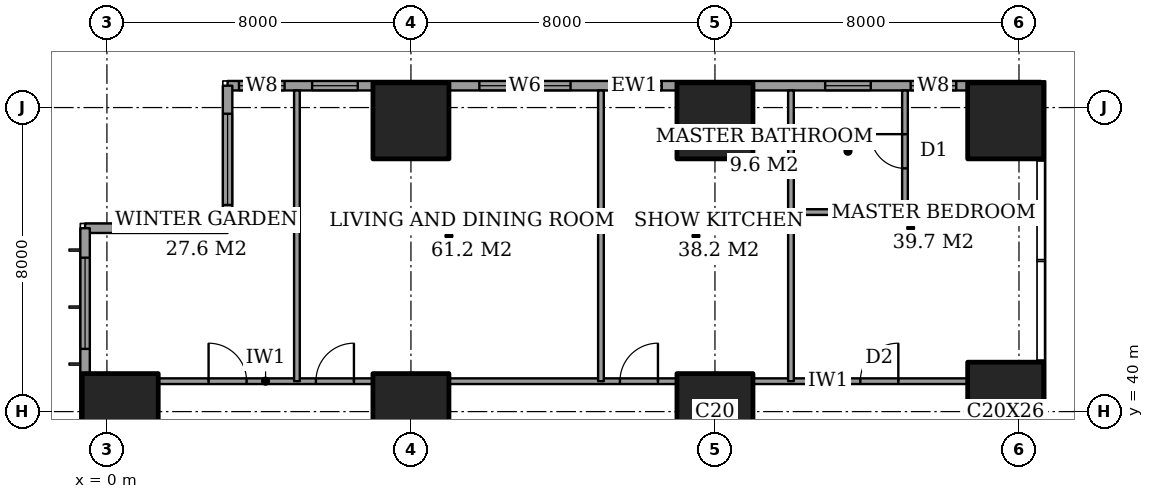
"""IFC4 building model, lengths in metres.
Left out: names, types, materials, properties, quantities, classifications, styles, units other than length and angle.
Written with IfcOpenShell. Run it as: python <this file> out.ifc"""

import sys

from ifc_helpers import new_model, si_unit, direction, frame, frame_2d, origin, origin_2d, place, context, subcontext, project, spatial, rectangle, extrude, element, fill, save


model = new_model("IFC4")
c1 = context("Model", 3, precision=1e-05, world=origin(), true_north=direction((0.0, 1.0)))
c2 = subcontext(c1, "Body", "Model", "MODEL_VIEW")
j1 = project(units=[si_unit("LENGTHUNIT", "METRE"), si_unit("PLANEANGLEUNIT", "RADIAN")], contexts=[c1])
p1 = place(None, origin())
s1 = spatial("IfcSite", under=j1, at=p1, CompositionType="ELEMENT")
p2 = place(p1, origin())
s2 = spatial("IfcBuilding", under=s1, at=p2, CompositionType="ELEMENT")
p3 = place(p2, frame((0.0, 0.0, 36.8)))
s3 = spatial("IfcBuildingStorey", under=s2, at=p3, CompositionType="ELEMENT", Elevation=36.8)
for number, where, z_axis, x_axis in (
    (1, (0.35, 40.0, 0.0), (0.0, 0.0, 1.0), (1.0, 0.0, 0.0)),
    (2, (8.0, 40.0, 0.0), (0.0, 0.0, 1.0), (1.0, 0.0, 0.0)),
    (3, (8.0, 47.65, 0.0), (0.0, 0.0, 1.0), (1.0, 0.0, 0.0)),
    (4, (16.0, 40.0, 0.0), (0.0, 0.0, 1.0), (1.0, 0.0, 0.0)),
    (5, (16.0, 47.65, 0.0), (0.0, 0.0, 1.0), (1.0, 0.0, 0.0)),
):
    element("IfcColumn", number, at=place(p3, frame(where, z_axis=z_axis, x_axis=x_axis)), inside=s3, PredefinedType="COLUMN", context=c2, shape_type="SweptSolid", body=[
        extrude(rectangle(XDim=2.0, YDim=2.0, at=origin_2d()), origin(), (0.0, 0.0, 1.0), 3.6),
    ])
p4 = place(p3, frame((23.65, 40.0, 0.0), z_axis=(0.0, 0.0, 1.0), x_axis=(1.0, 0.0, 0.0)))
e6 = element("IfcColumn", 6, at=p4, inside=s3, PredefinedType="COLUMN", context=c2, shape_type="SweptSolid", body=[
    extrude(rectangle(XDim=2.0, YDim=2.6, at=origin_2d()), origin(), (0.0, 0.0, 1.0), 3.6),
])
p5 = place(p3, frame((23.65, 47.65, 0.0), z_axis=(0.0, 0.0, 1.0), x_axis=(1.0, 0.0, 0.0)))
e7 = element("IfcColumn", 7, at=p5, inside=s3, PredefinedType="COLUMN", context=c2, shape_type="SweptSolid", body=[
    extrude(rectangle(XDim=2.0, YDim=2.0, at=origin_2d()), origin(), (0.0, 0.0, 1.0), 3.6),
])
p6 = place(p3, frame((24.575, 48.575, 0.0), z_axis=(0.0, 0.0, 1.0), x_axis=(-1.0, 0.0, 0.0)))
e8 = element("IfcWall", 8, at=p6, inside=s3, PredefinedType="SOLIDWALL", context=c2, shape_type="SweptSolid", body=[
    extrude(rectangle(XDim=21.4, YDim=0.25, at=frame_2d((10.7, 0.0))), origin(), (0.0, 0.0, 1.0), 3.6),
])
p7 = place(p6, frame((2.225, 0.0, 0.6)))
e9 = element("IfcOpeningElement", 9, at=p7, cuts=e8, PredefinedType="OPENING", context=c2, shape_type="SweptSolid", body=[
    extrude(rectangle(XDim=1.2, YDim=2.0, at=frame_2d((0.6, 1.0))), frame((0.0, 0.135, 0.0), z_axis=(0.0, -1.0, 0.0), x_axis=(1.0, 0.0, 0.0)), (0.0, 0.0, 1.0), 0.27),
])
p8 = place(p6, frame((4.475, 0.0, 0.6)))
e10 = element("IfcOpeningElement", 10, at=p8, cuts=e8, PredefinedType="OPENING", context=c2, shape_type="SweptSolid", body=[
    extrude(rectangle(XDim=1.2, YDim=2.0, at=frame_2d((0.6, 1.0))), frame((0.0, 0.135, 0.0), z_axis=(0.0, -1.0, 0.0), x_axis=(1.0, 0.0, 0.0)), (0.0, 0.0, 1.0), 0.27),
])
p9 = place(p6, frame((9.975, 0.0, 0.6)))
e11 = element("IfcOpeningElement", 11, at=p9, cuts=e8, PredefinedType="OPENING", context=c2, shape_type="SweptSolid", body=[
    extrude(rectangle(XDim=1.2, YDim=2.0, at=frame_2d((0.6, 1.0))), frame((0.0, 0.135, 0.0), z_axis=(0.0, -1.0, 0.0), x_axis=(1.0, 0.0, 0.0)), (0.0, 0.0, 1.0), 0.27),
])
p10 = place(p6, frame((12.375, 0.0, 0.6)))
e12 = element("IfcOpeningElement", 12, at=p10, cuts=e8, PredefinedType="OPENING", context=c2, shape_type="SweptSolid", body=[
    extrude(rectangle(XDim=2.4, YDim=2.0, at=frame_2d((1.2, 1.0))), frame((0.0, 0.135, 0.0), z_axis=(0.0, -1.0, 0.0), x_axis=(1.0, 0.0, 0.0)), (0.0, 0.0, 1.0), 0.27),
])
p11 = place(p6, frame((17.975, 0.0, 0.6)))
e13 = element("IfcOpeningElement", 13, at=p11, cuts=e8, PredefinedType="OPENING", context=c2, shape_type="SweptSolid", body=[
    extrude(rectangle(XDim=1.2, YDim=2.0, at=frame_2d((0.6, 1.0))), frame((0.0, 0.135, 0.0), z_axis=(0.0, -1.0, 0.0), x_axis=(1.0, 0.0, 0.0)), (0.0, 0.0, 1.0), 0.27),
])
p12 = place(p6, frame((19.9, 0.0, 0.6)))
e14 = element("IfcOpeningElement", 14, at=p12, cuts=e8, PredefinedType="OPENING", context=c2, shape_type="SweptSolid", body=[
    extrude(rectangle(XDim=1.2, YDim=2.0, at=frame_2d((0.6, 1.0))), frame((0.0, 0.135, 0.0), z_axis=(0.0, -1.0, 0.0), x_axis=(1.0, 0.0, 0.0)), (0.0, 0.0, 1.0), 0.27),
])
p13 = place(p3, frame((3.175, 48.575, 0.0), z_axis=(0.0, 0.0, 1.0), x_axis=(0.0, -1.0, 0.0)))
e15 = element("IfcWall", 15, at=p13, inside=s3, PredefinedType="SOLIDWALL", context=c2, shape_type="SweptSolid", body=[
    extrude(rectangle(XDim=3.75, YDim=0.25, at=frame_2d((1.875, 0.0))), origin(), (0.0, 0.0, 1.0), 3.6),
])
p14 = place(p13, frame((0.738, 0.0, 0.6)))
e16 = element("IfcOpeningElement", 16, at=p14, cuts=e15, PredefinedType="OPENING", context=c2, shape_type="SweptSolid", body=[
    extrude(rectangle(XDim=2.4, YDim=2.0, at=frame_2d((1.2, 1.0))), frame((0.0, 0.135, 0.0), z_axis=(0.0, -1.0, 0.0), x_axis=(1.0, 0.0, 0.0)), (0.0, 0.0, 1.0), 0.27),
])
p15 = place(p3, frame((3.175, 44.825, 0.0), z_axis=(0.0, 0.0, 1.0), x_axis=(-1.0, 0.0, 0.0)))
e17 = element("IfcWall", 17, at=p15, inside=s3, PredefinedType="SOLIDWALL", context=c2, shape_type="SweptSolid", body=[
    extrude(rectangle(XDim=3.75, YDim=0.25, at=frame_2d((1.875, 0.0))), origin(), (0.0, 0.0, 1.0), 3.6),
])
p16 = place(p15, frame((0.613, 0.0, 0.6)))
e18 = element("IfcOpeningElement", 18, at=p16, cuts=e17, PredefinedType="OPENING", context=c2, shape_type="SweptSolid", body=[
    extrude(rectangle(XDim=2.4, YDim=2.0, at=frame_2d((1.2, 1.0))), frame((0.0, 0.135, 0.0), z_axis=(0.0, -1.0, 0.0), x_axis=(1.0, 0.0, 0.0)), (0.0, 0.0, 1.0), 0.27),
])
p17 = place(p3, frame((-0.575, 44.825, 0.0), z_axis=(0.0, 0.0, 1.0), x_axis=(0.0, -1.0, 0.0)))
e19 = element("IfcWall", 19, at=p17, inside=s3, PredefinedType="SOLIDWALL", context=c2, shape_type="SweptSolid", body=[
    extrude(rectangle(XDim=41.65, YDim=0.25, at=frame_2d((20.825, 0.0))), origin(), (0.0, 0.0, 1.0), 3.6),
])
p18 = place(p17, frame((0.775, 0.0, 0.6)))
e20 = element("IfcOpeningElement", 20, at=p18, cuts=e19, PredefinedType="OPENING", context=c2, shape_type="SweptSolid", body=[
    extrude(rectangle(XDim=2.4, YDim=2.0, at=frame_2d((1.2, 1.0))), frame((0.0, 0.135, 0.0), z_axis=(0.0, -1.0, 0.0), x_axis=(1.0, 0.0, 0.0)), (0.0, 0.0, 1.0), 0.27),
])
p19 = place(p17, frame((6.1, 0.0, 0.6)))
e21 = element("IfcOpeningElement", 21, at=p19, cuts=e19, PredefinedType="OPENING", context=c2, shape_type="SweptSolid", body=[
    extrude(rectangle(XDim=1.2, YDim=2.0, at=frame_2d((0.6, 1.0))), frame((0.0, 0.135, 0.0), z_axis=(0.0, -1.0, 0.0), x_axis=(1.0, 0.0, 0.0)), (0.0, 0.0, 1.0), 0.27),
])
p20 = place(p17, frame((8.425, 0.0, 0.6)))
e22 = element("IfcOpeningElement", 22, at=p20, cuts=e19, PredefinedType="OPENING", context=c2, shape_type="SweptSolid", body=[
    extrude(rectangle(XDim=2.4, YDim=2.0, at=frame_2d((1.2, 1.0))), frame((0.0, 0.135, 0.0), z_axis=(0.0, -1.0, 0.0), x_axis=(1.0, 0.0, 0.0)), (0.0, 0.0, 1.0), 0.27),
])
p21 = place(p17, frame((15.625, 0.0, 0.6)))
e23 = element("IfcOpeningElement", 23, at=p21, cuts=e19, PredefinedType="OPENING", context=c2, shape_type="SweptSolid", body=[
    extrude(rectangle(XDim=2.4, YDim=2.0, at=frame_2d((1.2, 1.0))), frame((0.0, 0.135, 0.0), z_axis=(0.0, -1.0, 0.0), x_axis=(1.0, 0.0, 0.0)), (0.0, 0.0, 1.0), 0.27),
])
p22 = place(p17, frame((23.625, 0.0, 0.6)))
e24 = element("IfcOpeningElement", 24, at=p22, cuts=e19, PredefinedType="OPENING", context=c2, shape_type="SweptSolid", body=[
    extrude(rectangle(XDim=2.4, YDim=2.0, at=frame_2d((1.2, 1.0))), frame((0.0, 0.135, 0.0), z_axis=(0.0, -1.0, 0.0), x_axis=(1.0, 0.0, 0.0)), (0.0, 0.0, 1.0), 0.27),
])
p23 = place(p17, frame((30.825, 0.0, 0.6)))
e25 = element("IfcOpeningElement", 25, at=p23, cuts=e19, PredefinedType="OPENING", context=c2, shape_type="SweptSolid", body=[
    extrude(rectangle(XDim=2.4, YDim=2.0, at=frame_2d((1.2, 1.0))), frame((0.0, 0.135, 0.0), z_axis=(0.0, -1.0, 0.0), x_axis=(1.0, 0.0, 0.0)), (0.0, 0.0, 1.0), 0.27),
])
p24 = place(p17, frame((34.5, 0.0, 0.6)))
e26 = element("IfcOpeningElement", 26, at=p24, cuts=e19, PredefinedType="OPENING", context=c2, shape_type="SweptSolid", body=[
    extrude(rectangle(XDim=1.2, YDim=2.0, at=frame_2d((0.6, 1.0))), frame((0.0, 0.135, 0.0), z_axis=(0.0, -1.0, 0.0), x_axis=(1.0, 0.0, 0.0)), (0.0, 0.0, 1.0), 0.27),
])
p25 = place(p17, frame((38.475, 0.0, 0.6)))
e27 = element("IfcOpeningElement", 27, at=p25, cuts=e19, PredefinedType="OPENING", context=c2, shape_type="SweptSolid", body=[
    extrude(rectangle(XDim=2.4, YDim=2.0, at=frame_2d((1.2, 1.0))), frame((0.0, 0.135, 0.0), z_axis=(0.0, -1.0, 0.0), x_axis=(1.0, 0.0, 0.0)), (0.0, 0.0, 1.0), 0.27),
])
p26 = place(p3, frame((1.35, 40.8, 0.0), z_axis=(0.0, 0.0, 1.0), x_axis=(1.0, 0.0, 0.0)))
e28 = element("IfcWall", 28, at=p26, inside=s3, PredefinedType="PARTITIONING", context=c2, shape_type="SweptSolid", body=[
    extrude(rectangle(XDim=5.65, YDim=0.15, at=frame_2d((2.825, 0.0))), origin(), (0.0, 0.0, 1.0), 3.35),
])
p27 = place(p26, frame((1.325, 0.0, 0.0)))
e29 = element("IfcOpeningElement", 29, at=p27, cuts=e28, PredefinedType="OPENING", context=c2, shape_type="SweptSolid", body=[
    extrude(rectangle(XDim=1.0, YDim=2.1, at=frame_2d((0.5, 1.05))), frame((0.0, 0.085, 0.0), z_axis=(0.0, -1.0, 0.0), x_axis=(1.0, 0.0, 0.0)), (0.0, 0.0, 1.0), 0.17),
])
p28 = place(p26, frame((4.15, 0.0, 0.0)))
e30 = element("IfcOpeningElement", 30, at=p28, cuts=e28, PredefinedType="OPENING", context=c2, shape_type="SweptSolid", body=[
    extrude(rectangle(XDim=1.0, YDim=2.1, at=frame_2d((0.5, 1.05))), frame((0.0, 0.085, 0.0), z_axis=(0.0, -1.0, 0.0), x_axis=(1.0, 0.0, 0.0)), (0.0, 0.0, 1.0), 0.17),
])
p29 = place(p3, frame((9.0, 40.8, 0.0), z_axis=(0.0, 0.0, 1.0), x_axis=(1.0, 0.0, 0.0)))
e31 = element("IfcWall", 31, at=p29, inside=s3, PredefinedType="PARTITIONING", context=c2, shape_type="SweptSolid", body=[
    extrude(rectangle(XDim=6.0, YDim=0.15, at=frame_2d((3.0, 0.0))), origin(), (0.0, 0.0, 1.0), 3.35),
])
p30 = place(p29, frame((4.5, 0.0, 0.0)))
e32 = element("IfcOpeningElement", 32, at=p30, cuts=e31, PredefinedType="OPENING", context=c2, shape_type="SweptSolid", body=[
    extrude(rectangle(XDim=1.0, YDim=2.1, at=frame_2d((0.5, 1.05))), frame((0.0, 0.085, 0.0), z_axis=(0.0, -1.0, 0.0), x_axis=(1.0, 0.0, 0.0)), (0.0, 0.0, 1.0), 0.17),
])
p31 = place(p3, frame((17.0, 40.8, 0.0), z_axis=(0.0, 0.0, 1.0), x_axis=(1.0, 0.0, 0.0)))
e33 = element("IfcWall", 33, at=p31, inside=s3, PredefinedType="PARTITIONING", context=c2, shape_type="SweptSolid", body=[
    extrude(rectangle(XDim=5.65, YDim=0.15, at=frame_2d((2.825, 0.0))), origin(), (0.0, 0.0, 1.0), 3.35),
])
p32 = place(p31, frame((2.825, 0.0, 0.0)))
e34 = element("IfcOpeningElement", 34, at=p32, cuts=e33, PredefinedType="OPENING", context=c2, shape_type="SweptSolid", body=[
    extrude(rectangle(XDim=1.0, YDim=2.1, at=frame_2d((0.5, 1.05))), frame((0.0, 0.085, 0.0), z_axis=(0.0, -1.0, 0.0), x_axis=(1.0, 0.0, 0.0)), (0.0, 0.0, 1.0), 0.17),
])
p33 = place(p3, frame((18.0, 45.25, 0.0), z_axis=(0.0, 0.0, 1.0), x_axis=(1.0, 0.0, 0.0)))
e35 = element("IfcWall", 35, at=p33, inside=s3, PredefinedType="PARTITIONING", context=c2, shape_type="SweptSolid", body=[
    extrude(rectangle(XDim=3.0, YDim=0.15, at=frame_2d((1.5, 0.0))), origin(), (0.0, 0.0, 1.0), 3.35),
])
for number, where, z_axis, x_axis in (
    (36, (5.0, 40.8, 0.0), (0.0, 0.0, 1.0), (0.0, 1.0, 0.0)),
    (37, (13.0, 40.8, 0.0), (0.0, 0.0, 1.0), (0.0, 1.0, 0.0)),
    (38, (18.0, 40.8, 0.0), (0.0, 0.0, 1.0), (0.0, 1.0, 0.0)),
):
    element("IfcWall", number, at=place(p3, frame(where, z_axis=z_axis, x_axis=x_axis)), inside=s3, PredefinedType="PARTITIONING", context=c2, shape_type="SweptSolid", body=[
        extrude(rectangle(XDim=7.65, YDim=0.15, at=frame_2d((3.825, 0.0))), origin(), (0.0, 0.0, 1.0), 3.35),
    ])
p34 = place(p3, frame((21.0, 45.25, 0.0), z_axis=(0.0, 0.0, 1.0), x_axis=(0.0, 1.0, 0.0)))
e39 = element("IfcWall", 39, at=p34, inside=s3, PredefinedType="PARTITIONING", context=c2, shape_type="SweptSolid", body=[
    extrude(rectangle(XDim=3.2, YDim=0.15, at=frame_2d((1.6, 0.0))), origin(), (0.0, 0.0, 1.0), 3.35),
])
p35 = place(p34, frame((1.15, 0.0, 0.0)))
e40 = element("IfcOpeningElement", 40, at=p35, cuts=e39, PredefinedType="OPENING", context=c2, shape_type="SweptSolid", body=[
    extrude(rectangle(XDim=0.9, YDim=2.1, at=frame_2d((0.45, 1.05))), frame((0.0, 0.085, 0.0), z_axis=(0.0, -1.0, 0.0), x_axis=(1.0, 0.0, 0.0)), (0.0, 0.0, 1.0), 0.17),
])
p36 = place(p7, origin())
e41 = element("IfcWindow", 41, at=p36, inside=s3, PartitioningType="SINGLE_PANEL", PredefinedType="WINDOW", context=c2, shape_type="SweptSolid", body=[
    extrude(rectangle(XDim=1.2, YDim=2.0, at=frame_2d((0.6, 1.0))), frame((0.0, 0.03, 0.0), z_axis=(0.0, -1.0, 0.0), x_axis=(1.0, 0.0, 0.0)), (0.0, 0.0, 1.0), 0.06),
])
fill(e9, e41)
p37 = place(p8, origin())
e42 = element("IfcWindow", 42, at=p37, inside=s3, PartitioningType="SINGLE_PANEL", PredefinedType="WINDOW", context=c2, shape_type="SweptSolid", body=[
    extrude(rectangle(XDim=1.2, YDim=2.0, at=frame_2d((0.6, 1.0))), frame((0.0, 0.03, 0.0), z_axis=(0.0, -1.0, 0.0), x_axis=(1.0, 0.0, 0.0)), (0.0, 0.0, 1.0), 0.06),
])
fill(e10, e42)
p38 = place(p9, origin())
e43 = element("IfcWindow", 43, at=p38, inside=s3, PartitioningType="SINGLE_PANEL", PredefinedType="WINDOW", context=c2, shape_type="SweptSolid", body=[
    extrude(rectangle(XDim=1.2, YDim=2.0, at=frame_2d((0.6, 1.0))), frame((0.0, 0.03, 0.0), z_axis=(0.0, -1.0, 0.0), x_axis=(1.0, 0.0, 0.0)), (0.0, 0.0, 1.0), 0.06),
])
fill(e11, e43)
p39 = place(p10, origin())
e44 = element("IfcWindow", 44, at=p39, inside=s3, PartitioningType="SINGLE_PANEL", PredefinedType="WINDOW", context=c2, shape_type="SweptSolid", body=[
    extrude(rectangle(XDim=2.4, YDim=2.0, at=frame_2d((1.2, 1.0))), frame((0.0, 0.03, 0.0), z_axis=(0.0, -1.0, 0.0), x_axis=(1.0, 0.0, 0.0)), (0.0, 0.0, 1.0), 0.06),
])
fill(e12, e44)
p40 = place(p11, origin())
e45 = element("IfcWindow", 45, at=p40, inside=s3, PartitioningType="SINGLE_PANEL", PredefinedType="WINDOW", context=c2, shape_type="SweptSolid", body=[
    extrude(rectangle(XDim=1.2, YDim=2.0, at=frame_2d((0.6, 1.0))), frame((0.0, 0.03, 0.0), z_axis=(0.0, -1.0, 0.0), x_axis=(1.0, 0.0, 0.0)), (0.0, 0.0, 1.0), 0.06),
])
fill(e13, e45)
p41 = place(p12, origin())
e46 = element("IfcWindow", 46, at=p41, inside=s3, PartitioningType="SINGLE_PANEL", PredefinedType="WINDOW", context=c2, shape_type="SweptSolid", body=[
    extrude(rectangle(XDim=1.2, YDim=2.0, at=frame_2d((0.6, 1.0))), frame((0.0, 0.03, 0.0), z_axis=(0.0, -1.0, 0.0), x_axis=(1.0, 0.0, 0.0)), (0.0, 0.0, 1.0), 0.06),
])
fill(e14, e46)
p42 = place(p14, origin())
e47 = element("IfcWindow", 47, at=p42, inside=s3, PartitioningType="SINGLE_PANEL", PredefinedType="WINDOW", context=c2, shape_type="SweptSolid", body=[
    extrude(rectangle(XDim=2.4, YDim=2.0, at=frame_2d((1.2, 1.0))), frame((0.0, 0.03, 0.0), z_axis=(0.0, -1.0, 0.0), x_axis=(1.0, 0.0, 0.0)), (0.0, 0.0, 1.0), 0.06),
])
fill(e16, e47)
p43 = place(p16, origin())
e48 = element("IfcWindow", 48, at=p43, inside=s3, PartitioningType="SINGLE_PANEL", PredefinedType="WINDOW", context=c2, shape_type="SweptSolid", body=[
    extrude(rectangle(XDim=2.4, YDim=2.0, at=frame_2d((1.2, 1.0))), frame((0.0, 0.03, 0.0), z_axis=(0.0, -1.0, 0.0), x_axis=(1.0, 0.0, 0.0)), (0.0, 0.0, 1.0), 0.06),
])
fill(e18, e48)
p44 = place(p18, origin())
e49 = element("IfcWindow", 49, at=p44, inside=s3, PartitioningType="SINGLE_PANEL", PredefinedType="WINDOW", context=c2, shape_type="SweptSolid", body=[
    extrude(rectangle(XDim=2.4, YDim=2.0, at=frame_2d((1.2, 1.0))), frame((0.0, 0.03, 0.0), z_axis=(0.0, -1.0, 0.0), x_axis=(1.0, 0.0, 0.0)), (0.0, 0.0, 1.0), 0.06),
])
fill(e20, e49)
p45 = place(p27, origin())
e50 = element("IfcDoor", 50, at=p45, inside=s3, OperationType="SINGLE_SWING_RIGHT", PredefinedType="DOOR", context=c2, shape_type="SweptSolid", body=[
    extrude(rectangle(XDim=1.0, YDim=2.1, at=frame_2d((0.5, 1.05))), frame((0.0, 0.025, 0.0), z_axis=(0.0, -1.0, 0.0), x_axis=(1.0, 0.0, 0.0)), (0.0, 0.0, 1.0), 0.05),
])
fill(e29, e50)
p46 = place(p28, origin())
e51 = element("IfcDoor", 51, at=p46, inside=s3, OperationType="SINGLE_SWING_LEFT", PredefinedType="DOOR", context=c2, shape_type="SweptSolid", body=[
    extrude(rectangle(XDim=1.0, YDim=2.1, at=frame_2d((0.5, 1.05))), frame((0.0, 0.025, 0.0), z_axis=(0.0, -1.0, 0.0), x_axis=(1.0, 0.0, 0.0)), (0.0, 0.0, 1.0), 0.05),
])
fill(e30, e51)
p47 = place(p30, origin())
e52 = element("IfcDoor", 52, at=p47, inside=s3, OperationType="SINGLE_SWING_LEFT", PredefinedType="DOOR", context=c2, shape_type="SweptSolid", body=[
    extrude(rectangle(XDim=1.0, YDim=2.1, at=frame_2d((0.5, 1.05))), frame((0.0, 0.025, 0.0), z_axis=(0.0, -1.0, 0.0), x_axis=(1.0, 0.0, 0.0)), (0.0, 0.0, 1.0), 0.05),
])
fill(e32, e52)
p48 = place(p35, origin())
e53 = element("IfcDoor", 53, at=p48, inside=s3, OperationType="SINGLE_SWING_LEFT", PredefinedType="DOOR", context=c2, shape_type="SweptSolid", body=[
    extrude(rectangle(XDim=0.9, YDim=2.1, at=frame_2d((0.45, 1.05))), frame((0.0, 0.025, 0.0), z_axis=(0.0, -1.0, 0.0), x_axis=(1.0, 0.0, 0.0)), (0.0, 0.0, 1.0), 0.05),
])
fill(e40, e53)
p49 = place(p32, origin())
e54 = element("IfcDoor", 54, at=p49, inside=s3, OperationType="SINGLE_SWING_LEFT", PredefinedType="DOOR", context=c2, shape_type="SweptSolid", body=[
    extrude(rectangle(XDim=1.0, YDim=2.1, at=frame_2d((0.5, 1.05))), frame((0.0, 0.025, 0.0), z_axis=(0.0, -1.0, 0.0), x_axis=(1.0, 0.0, 0.0)), (0.0, 0.0, 1.0), 0.05),
])
fill(e34, e54)
save(model, sys.argv[1])
